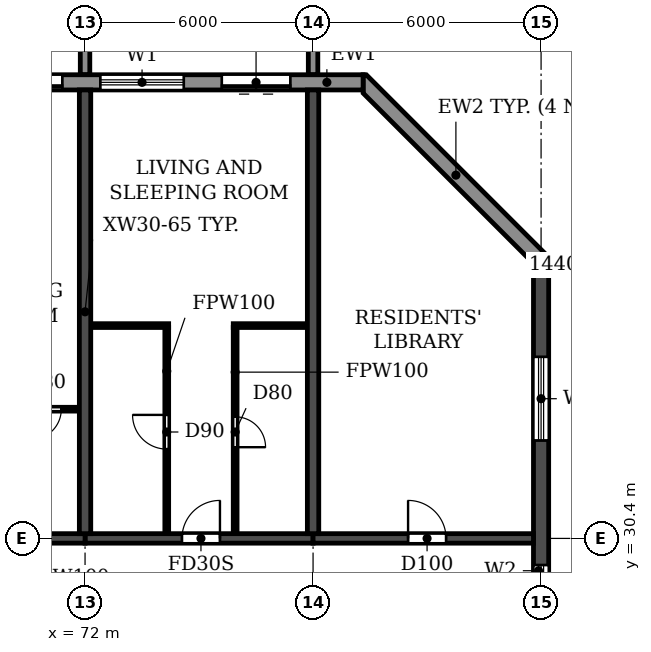
"""IFC4 building model, lengths in metres.
Left out: names, types, materials, properties, quantities, classifications, styles, units other than length and angle.
Written with IfcOpenShell. Run it as: python <this file> out.ifc"""

import sys

from ifc_helpers import new_model, si_unit, direction, frame, frame_2d, origin, place, context, subcontext, project, spatial, polyline, rectangle, outline, extrude, source, transform, mapped, element, fill, save


model = new_model("IFC4")
c1 = context("Model", 3, precision=1e-05, world=origin(), true_north=direction((0.0, 1.0)))
c2 = subcontext(c1, "Body", "Model", "MODEL_VIEW")
j1 = project(units=[si_unit("LENGTHUNIT", "METRE"), si_unit("PLANEANGLEUNIT", "RADIAN")], contexts=[c1])
p1 = place(None, origin())
s1 = spatial("IfcSite", under=j1, at=p1, CompositionType="ELEMENT")
p2 = place(p1, origin())
s2 = spatial("IfcBuilding", under=s1, at=p2, CompositionType="ELEMENT")
p3 = place(p2, frame((0.0, 0.0, 162.0)))
s3 = spatial("IfcBuildingStorey", under=s2, at=p3, CompositionType="ELEMENT", Elevation=162.0)
for number, where, z_axis, x_axis in (
    (1, (72.0, 30.525, 0.0), (0.0, 0.0, 1.0), (0.0, 1.0, 0.0)),
    (2, (78.0, 30.525, 0.0), (0.0, 0.0, 1.0), (0.0, 1.0, 0.0)),
):
    element("IfcWall", number, at=place(p3, frame(where, z_axis=z_axis, x_axis=x_axis)), inside=s3, PredefinedType="SHEAR", context=c2, shape_type="SweptSolid", body=[
        extrude(rectangle(XDim=11.675, YDim=0.3, at=frame_2d((5.837, 0.0))), origin(), (0.0, 0.0, 1.0), 2.95),
    ])
p4 = place(p3, frame((84.0, 4.683, 0.0), z_axis=(0.0, 0.0, 1.0), x_axis=(0.0, 1.0, 0.0)))
e3 = element("IfcWall", 3, at=p4, inside=s3, PredefinedType="SHEAR", context=c2, shape_type="SweptSolid", body=[
    extrude(rectangle(XDim=33.034, YDim=0.4, at=frame_2d((16.517, 0.0))), origin(), (0.0, 0.0, 1.0), 2.95),
])
p5 = place(p4, frame((23.817, 0.0, 0.9)))
e4 = element("IfcOpeningElement", 4, at=p5, cuts=e3, PredefinedType="OPENING", context=c2, shape_type="SweptSolid", body=[
    extrude(rectangle(XDim=1.2, YDim=1.5, at=frame_2d((0.6, 0.75))), frame((0.0, 0.21, 0.0), z_axis=(0.0, -1.0, 0.0), x_axis=(1.0, 0.0, 0.0)), (0.0, 0.0, 1.0), 0.42),
])
p6 = place(p4, frame((8.017, 0.0, 0.9)))
e5 = element("IfcOpeningElement", 5, at=p6, cuts=e3, PredefinedType="OPENING", context=c2, shape_type="SweptSolid", body=[
    extrude(rectangle(XDim=1.2, YDim=1.5, at=frame_2d((0.6, 0.75))), frame((0.0, 0.21, 0.0), z_axis=(0.0, -1.0, 0.0), x_axis=(1.0, 0.0, 0.0)), (0.0, 0.0, 1.0), 0.42),
])
p7 = place(p4, frame((28.293, 0.0, 0.6)))
e6 = element("IfcOpeningElement", 6, at=p7, cuts=e3, PredefinedType="OPENING", context=c2, shape_type="SweptSolid", body=[
    extrude(rectangle(XDim=2.2, YDim=1.8, at=frame_2d((1.1, 0.9))), frame((0.0, 0.21, 0.0), z_axis=(0.0, -1.0, 0.0), x_axis=(1.0, 0.0, 0.0)), (0.0, 0.0, 1.0), 0.42),
])
p8 = place(p4, frame((2.541, 0.0, 0.6)))
e7 = element("IfcOpeningElement", 7, at=p8, cuts=e3, PredefinedType="OPENING", context=c2, shape_type="SweptSolid", body=[
    extrude(rectangle(XDim=2.2, YDim=1.8, at=frame_2d((1.1, 0.9))), frame((0.0, 0.21, 0.0), z_axis=(0.0, -1.0, 0.0), x_axis=(1.0, 0.0, 0.0)), (0.0, 0.0, 1.0), 0.42),
])
p9 = place(p4, frame((15.917, 0.0, 0.9)))
e8 = element("IfcOpeningElement", 8, at=p9, cuts=e3, PredefinedType="OPENING", context=c2, shape_type="SweptSolid", body=[
    extrude(rectangle(XDim=1.2, YDim=1.5, at=frame_2d((0.6, 0.75))), frame((0.0, 0.21, 0.0), z_axis=(0.0, -1.0, 0.0), x_axis=(1.0, 0.0, 0.0)), (0.0, 0.0, 1.0), 0.42),
])
p10 = place(p3, frame((66.0, 30.4, 0.0), z_axis=(0.0, 0.0, 1.0), x_axis=(1.0, 0.0, 0.0)))
e9 = element("IfcWall", 9, at=p10, inside=s3, PredefinedType="SHEAR", context=c2, shape_type="SweptSolid", body=[
    extrude(rectangle(XDim=6.0, YDim=0.25, at=frame_2d((3.0, 0.0))), origin(), (0.0, 0.0, 1.0), 2.35),
])
p11 = place(p10, frame((2.55, 0.0, 0.0)))
e10 = element("IfcOpeningElement", 10, at=p11, cuts=e9, PredefinedType="OPENING", context=c2, shape_type="SweptSolid", body=[
    extrude(rectangle(XDim=1.0, YDim=2.1, at=frame_2d((0.5, 1.05))), frame((0.0, 0.135, 0.0), z_axis=(0.0, -1.0, 0.0), x_axis=(1.0, 0.0, 0.0)), (0.0, 0.0, 1.0), 0.27),
])
p12 = place(p3, frame((72.0, 30.4, 0.0), z_axis=(0.0, 0.0, 1.0), x_axis=(1.0, 0.0, 0.0)))
e11 = element("IfcWall", 11, at=p12, inside=s3, PredefinedType="SHEAR", context=c2, shape_type="SweptSolid", body=[
    extrude(rectangle(XDim=6.0, YDim=0.25, at=frame_2d((3.0, 0.0))), origin(), (0.0, 0.0, 1.0), 2.35),
])
p13 = place(p12, frame((2.55, 0.0, 0.0)))
e12 = element("IfcOpeningElement", 12, at=p13, cuts=e11, PredefinedType="OPENING", context=c2, shape_type="SweptSolid", body=[
    extrude(rectangle(XDim=1.0, YDim=2.1, at=frame_2d((0.5, 1.05))), frame((0.0, 0.135, 0.0), z_axis=(0.0, -1.0, 0.0), x_axis=(1.0, 0.0, 0.0)), (0.0, 0.0, 1.0), 0.27),
])
p14 = place(p3, frame((78.0, 30.4, 0.0), z_axis=(0.0, 0.0, 1.0), x_axis=(1.0, 0.0, 0.0)))
e13 = element("IfcWall", 13, at=p14, inside=s3, PredefinedType="SHEAR", context=c2, shape_type="SweptSolid", body=[
    extrude(rectangle(XDim=5.8, YDim=0.25, at=frame_2d((2.9, 0.0))), origin(), (0.0, 0.0, 1.0), 2.35),
])
p15 = place(p14, frame((2.5, 0.0, 0.0)))
e14 = element("IfcOpeningElement", 14, at=p15, cuts=e13, PredefinedType="OPENING", context=c2, shape_type="SweptSolid", body=[
    extrude(rectangle(XDim=1.0, YDim=2.1, at=frame_2d((0.5, 1.05))), frame((0.0, 0.135, 0.0), z_axis=(0.0, -1.0, 0.0), x_axis=(1.0, 0.0, 0.0)), (0.0, 0.0, 1.0), 0.27),
])
p16 = place(p3, origin())
e15 = element("IfcWall", 15, at=p16, inside=s3, PredefinedType="STANDARD", context=c2, shape_type="SweptSolid", body=[
    extrude(outline(polyline([(84.2, 37.717), (84.2, 37.8), (79.4, 42.6), (79.317, 42.6), (79.317, 42.117), (83.717, 37.717), (84.2, 37.717)])), origin(), (0.0, 0.0, 1.0), 2.95),
])
p17 = place(p3, frame((79.317, 42.4, 0.0), z_axis=(0.0, 0.0, 1.0), x_axis=(-1.0, 0.0, 0.0)))
e16 = element("IfcWall", 16, at=p17, inside=s3, PredefinedType="STANDARD", context=c2, shape_type="SweptSolid", body=[
    extrude(rectangle(XDim=56.634, YDim=0.4, at=frame_2d((28.317, 0.0))), origin(), (0.0, 0.0, 1.0), 2.95),
])
p18 = place(p17, frame((52.717, 0.0, 0.9)))
e17 = element("IfcOpeningElement", 17, at=p18, cuts=e16, PredefinedType="OPENING", context=c2, shape_type="SweptSolid", body=[
    extrude(rectangle(XDim=2.2, YDim=1.5, at=frame_2d((1.1, 0.75))), frame((0.0, 0.21, 0.0), z_axis=(0.0, -1.0, 0.0), x_axis=(1.0, 0.0, 0.0)), (0.0, 0.0, 1.0), 0.42),
])
p19 = place(p17, frame((49.917, 0.0, 0.0)))
e18 = element("IfcOpeningElement", 18, at=p19, cuts=e16, PredefinedType="OPENING", context=c2, shape_type="SweptSolid", body=[
    extrude(rectangle(XDim=1.8, YDim=2.4, at=frame_2d((0.9, 1.2))), frame((0.0, 0.21, 0.0), z_axis=(0.0, -1.0, 0.0), x_axis=(1.0, 0.0, 0.0)), (0.0, 0.0, 1.0), 0.42),
])
p20 = place(p17, frame((46.717, 0.0, 0.9)))
e19 = element("IfcOpeningElement", 19, at=p20, cuts=e16, PredefinedType="OPENING", context=c2, shape_type="SweptSolid", body=[
    extrude(rectangle(XDim=2.2, YDim=1.5, at=frame_2d((1.1, 0.75))), frame((0.0, 0.21, 0.0), z_axis=(0.0, -1.0, 0.0), x_axis=(1.0, 0.0, 0.0)), (0.0, 0.0, 1.0), 0.42),
])
p21 = place(p17, frame((43.917, 0.0, 0.0)))
e20 = element("IfcOpeningElement", 20, at=p21, cuts=e16, PredefinedType="OPENING", context=c2, shape_type="SweptSolid", body=[
    extrude(rectangle(XDim=1.8, YDim=2.4, at=frame_2d((0.9, 1.2))), frame((0.0, 0.21, 0.0), z_axis=(0.0, -1.0, 0.0), x_axis=(1.0, 0.0, 0.0)), (0.0, 0.0, 1.0), 0.42),
])
p22 = place(p17, frame((40.717, 0.0, 0.9)))
e21 = element("IfcOpeningElement", 21, at=p22, cuts=e16, PredefinedType="OPENING", context=c2, shape_type="SweptSolid", body=[
    extrude(rectangle(XDim=2.2, YDim=1.5, at=frame_2d((1.1, 0.75))), frame((0.0, 0.21, 0.0), z_axis=(0.0, -1.0, 0.0), x_axis=(1.0, 0.0, 0.0)), (0.0, 0.0, 1.0), 0.42),
])
p23 = place(p17, frame((37.917, 0.0, 0.0)))
e22 = element("IfcOpeningElement", 22, at=p23, cuts=e16, PredefinedType="OPENING", context=c2, shape_type="SweptSolid", body=[
    extrude(rectangle(XDim=1.8, YDim=2.4, at=frame_2d((0.9, 1.2))), frame((0.0, 0.21, 0.0), z_axis=(0.0, -1.0, 0.0), x_axis=(1.0, 0.0, 0.0)), (0.0, 0.0, 1.0), 0.42),
])
p24 = place(p17, frame((34.717, 0.0, 0.9)))
e23 = element("IfcOpeningElement", 23, at=p24, cuts=e16, PredefinedType="OPENING", context=c2, shape_type="SweptSolid", body=[
    extrude(rectangle(XDim=2.2, YDim=1.5, at=frame_2d((1.1, 0.75))), frame((0.0, 0.21, 0.0), z_axis=(0.0, -1.0, 0.0), x_axis=(1.0, 0.0, 0.0)), (0.0, 0.0, 1.0), 0.42),
])
p25 = place(p17, frame((31.717, 0.0, 0.9)))
e24 = element("IfcOpeningElement", 24, at=p25, cuts=e16, PredefinedType="OPENING", context=c2, shape_type="SweptSolid", body=[
    extrude(rectangle(XDim=2.2, YDim=1.5, at=frame_2d((1.1, 0.75))), frame((0.0, 0.21, 0.0), z_axis=(0.0, -1.0, 0.0), x_axis=(1.0, 0.0, 0.0)), (0.0, 0.0, 1.0), 0.42),
])
p26 = place(p17, frame((28.717, 0.0, 0.9)))
e25 = element("IfcOpeningElement", 25, at=p26, cuts=e16, PredefinedType="OPENING", context=c2, shape_type="SweptSolid", body=[
    extrude(rectangle(XDim=2.2, YDim=1.5, at=frame_2d((1.1, 0.75))), frame((0.0, 0.21, 0.0), z_axis=(0.0, -1.0, 0.0), x_axis=(1.0, 0.0, 0.0)), (0.0, 0.0, 1.0), 0.42),
])
p27 = place(p17, frame((25.717, 0.0, 0.9)))
e26 = element("IfcOpeningElement", 26, at=p27, cuts=e16, PredefinedType="OPENING", context=c2, shape_type="SweptSolid", body=[
    extrude(rectangle(XDim=2.2, YDim=1.5, at=frame_2d((1.1, 0.75))), frame((0.0, 0.21, 0.0), z_axis=(0.0, -1.0, 0.0), x_axis=(1.0, 0.0, 0.0)), (0.0, 0.0, 1.0), 0.42),
])
p28 = place(p17, frame((22.717, 0.0, 0.9)))
e27 = element("IfcOpeningElement", 27, at=p28, cuts=e16, PredefinedType="OPENING", context=c2, shape_type="SweptSolid", body=[
    extrude(rectangle(XDim=2.2, YDim=1.5, at=frame_2d((1.1, 0.75))), frame((0.0, 0.21, 0.0), z_axis=(0.0, -1.0, 0.0), x_axis=(1.0, 0.0, 0.0)), (0.0, 0.0, 1.0), 0.42),
])
p29 = place(p17, frame((19.917, 0.0, 0.0)))
e28 = element("IfcOpeningElement", 28, at=p29, cuts=e16, PredefinedType="OPENING", context=c2, shape_type="SweptSolid", body=[
    extrude(rectangle(XDim=1.8, YDim=2.4, at=frame_2d((0.9, 1.2))), frame((0.0, 0.21, 0.0), z_axis=(0.0, -1.0, 0.0), x_axis=(1.0, 0.0, 0.0)), (0.0, 0.0, 1.0), 0.42),
])
p30 = place(p17, frame((16.717, 0.0, 0.9)))
e29 = element("IfcOpeningElement", 29, at=p30, cuts=e16, PredefinedType="OPENING", context=c2, shape_type="SweptSolid", body=[
    extrude(rectangle(XDim=2.2, YDim=1.5, at=frame_2d((1.1, 0.75))), frame((0.0, 0.21, 0.0), z_axis=(0.0, -1.0, 0.0), x_axis=(1.0, 0.0, 0.0)), (0.0, 0.0, 1.0), 0.42),
])
p31 = place(p17, frame((13.717, 0.0, 0.9)))
e30 = element("IfcOpeningElement", 30, at=p31, cuts=e16, PredefinedType="OPENING", context=c2, shape_type="SweptSolid", body=[
    extrude(rectangle(XDim=2.2, YDim=1.5, at=frame_2d((1.1, 0.75))), frame((0.0, 0.21, 0.0), z_axis=(0.0, -1.0, 0.0), x_axis=(1.0, 0.0, 0.0)), (0.0, 0.0, 1.0), 0.42),
])
p32 = place(p17, frame((10.717, 0.0, 0.9)))
e31 = element("IfcOpeningElement", 31, at=p32, cuts=e16, PredefinedType="OPENING", context=c2, shape_type="SweptSolid", body=[
    extrude(rectangle(XDim=2.2, YDim=1.5, at=frame_2d((1.1, 0.75))), frame((0.0, 0.21, 0.0), z_axis=(0.0, -1.0, 0.0), x_axis=(1.0, 0.0, 0.0)), (0.0, 0.0, 1.0), 0.42),
])
p33 = place(p17, frame((7.917, 0.0, 0.0)))
e32 = element("IfcOpeningElement", 32, at=p33, cuts=e16, PredefinedType="OPENING", context=c2, shape_type="SweptSolid", body=[
    extrude(rectangle(XDim=1.8, YDim=2.4, at=frame_2d((0.9, 1.2))), frame((0.0, 0.21, 0.0), z_axis=(0.0, -1.0, 0.0), x_axis=(1.0, 0.0, 0.0)), (0.0, 0.0, 1.0), 0.42),
])
p34 = place(p17, frame((4.717, 0.0, 0.9)))
e33 = element("IfcOpeningElement", 33, at=p34, cuts=e16, PredefinedType="OPENING", context=c2, shape_type="SweptSolid", body=[
    extrude(rectangle(XDim=2.2, YDim=1.5, at=frame_2d((1.1, 0.75))), frame((0.0, 0.21, 0.0), z_axis=(0.0, -1.0, 0.0), x_axis=(1.0, 0.0, 0.0)), (0.0, 0.0, 1.0), 0.42),
])
p35 = place(p17, frame((1.917, 0.0, 0.0)))
e34 = element("IfcOpeningElement", 34, at=p35, cuts=e16, PredefinedType="OPENING", context=c2, shape_type="SweptSolid", body=[
    extrude(rectangle(XDim=1.8, YDim=2.4, at=frame_2d((0.9, 1.2))), frame((0.0, 0.21, 0.0), z_axis=(0.0, -1.0, 0.0), x_axis=(1.0, 0.0, 0.0)), (0.0, 0.0, 1.0), 0.42),
])
m1 = source(origin(), c2, "Body", "SweptSolid", [
    extrude(outline(polyline([(0.0, 0.0), (0.25, 0.0), (0.25, 3.1), (0.0, 3.1), (0.0, 0.0)])), origin(), (0.0, 0.0, 1.0), 3.1),
])
for number, where in (
    (35, (71.875, 42.6, 0.0)),
    (36, (77.875, 42.6, 0.0)),
):
    element("IfcWall", number, at=place(p3, frame(where)), inside=s3, PredefinedType="STANDARD", context=c2, shape_type="MappedRepresentation", body=[
        mapped(m1, transform((0.0, 0.0, 0.0))),
    ])
p36 = place(p3, frame((69.9, 33.8, 0.0), z_axis=(0.0, 0.0, 1.0), x_axis=(1.0, 0.0, 0.0)))
e37 = element("IfcWall", 37, at=p36, inside=s3, PredefinedType="PARTITIONING", context=c2, shape_type="SweptSolid", body=[
    extrude(rectangle(XDim=1.94, YDim=0.1, at=frame_2d((0.97, 0.0))), origin(), (0.0, 0.0, 1.0), 2.95),
])
p37 = place(p36, frame((0.675, 0.0, 0.0)))
e38 = element("IfcOpeningElement", 38, at=p37, cuts=e37, PredefinedType="OPENING", context=c2, shape_type="SweptSolid", body=[
    extrude(rectangle(XDim=0.8, YDim=2.1, at=frame_2d((0.4, 1.05))), frame((0.0, 0.06, 0.0), z_axis=(0.0, -1.0, 0.0), x_axis=(1.0, 0.0, 0.0)), (0.0, 0.0, 1.0), 0.12),
])
p38 = place(p3, frame((72.16, 36.0, 0.0), z_axis=(0.0, 0.0, 1.0), x_axis=(1.0, 0.0, 0.0)))
e39 = element("IfcWall", 39, at=p38, inside=s3, PredefinedType="PARTITIONING", context=c2, shape_type="SweptSolid", body=[
    extrude(rectangle(XDim=2.04, YDim=0.1, at=frame_2d((1.02, 0.0))), origin(), (0.0, 0.0, 1.0), 2.95),
])
p39 = place(p3, frame((75.9, 36.0, 0.0), z_axis=(0.0, 0.0, 1.0), x_axis=(1.0, 0.0, 0.0)))
e40 = element("IfcWall", 40, at=p39, inside=s3, PredefinedType="PARTITIONING", context=c2, shape_type="SweptSolid", body=[
    extrude(rectangle(XDim=1.94, YDim=0.1, at=frame_2d((0.97, 0.0))), origin(), (0.0, 0.0, 1.0), 2.95),
])
p40 = place(p3, frame((74.15, 30.535, 0.0), z_axis=(0.0, 0.0, 1.0), x_axis=(0.0, 1.0, 0.0)))
e41 = element("IfcWall", 41, at=p40, inside=s3, PredefinedType="PARTITIONING", context=c2, shape_type="SweptSolid", body=[
    extrude(rectangle(XDim=5.415, YDim=0.1, at=frame_2d((2.708, 0.0))), origin(), (0.0, 0.0, 1.0), 2.95),
])
p41 = place(p40, frame((2.215, 0.0, 0.0)))
e42 = element("IfcOpeningElement", 42, at=p41, cuts=e41, PredefinedType="OPENING", context=c2, shape_type="SweptSolid", body=[
    extrude(rectangle(XDim=0.9, YDim=2.1, at=frame_2d((0.45, 1.05))), frame((0.0, 0.06, 0.0), z_axis=(0.0, -1.0, 0.0), x_axis=(1.0, 0.0, 0.0)), (0.0, 0.0, 1.0), 0.12),
])
p42 = place(p3, frame((75.95, 30.535, 0.0), z_axis=(0.0, 0.0, 1.0), x_axis=(0.0, 1.0, 0.0)))
e43 = element("IfcWall", 43, at=p42, inside=s3, PredefinedType="PARTITIONING", context=c2, shape_type="SweptSolid", body=[
    extrude(rectangle(XDim=5.415, YDim=0.1, at=frame_2d((2.708, 0.0))), origin(), (0.0, 0.0, 1.0), 2.95),
])
p43 = place(p42, frame((2.265, 0.0, 0.0)))
e44 = element("IfcOpeningElement", 44, at=p43, cuts=e43, PredefinedType="OPENING", context=c2, shape_type="SweptSolid", body=[
    extrude(rectangle(XDim=0.8, YDim=2.1, at=frame_2d((0.4, 1.05))), frame((0.0, 0.06, 0.0), z_axis=(0.0, -1.0, 0.0), x_axis=(1.0, 0.0, 0.0)), (0.0, 0.0, 1.0), 0.12),
])
p44 = place(p5, origin())
e45 = element("IfcWindow", 45, at=p44, inside=s3, PartitioningType="SINGLE_PANEL", PredefinedType="WINDOW", context=c2, shape_type="SweptSolid", body=[
    extrude(rectangle(XDim=1.2, YDim=1.5, at=frame_2d((0.6, 0.75))), frame((0.0, 0.03, 0.0), z_axis=(0.0, -1.0, 0.0), x_axis=(1.0, 0.0, 0.0)), (0.0, 0.0, 1.0), 0.06),
])
fill(e4, e45)
p45 = place(p7, origin())
e46 = element("IfcWindow", 46, at=p45, inside=s3, PartitioningType="DOUBLE_PANEL_HORIZONTAL", PredefinedType="WINDOW", context=c2, shape_type="SweptSolid", body=[
    extrude(rectangle(XDim=2.2, YDim=1.8, at=frame_2d((1.1, 0.9))), frame((0.0, 0.03, 0.0), z_axis=(0.0, -1.0, 0.0), x_axis=(1.0, 0.0, 0.0)), (0.0, 0.0, 1.0), 0.06),
])
fill(e6, e46)
p46 = place(p33, origin())
e47 = element("IfcDoor", 47, at=p46, inside=s3, OperationType="DOUBLE_DOOR_SLIDING", PredefinedType="DOOR", context=c2, shape_type="SweptSolid", body=[
    extrude(rectangle(XDim=1.8, YDim=2.4, at=frame_2d((0.9, 1.2))), frame((0.0, 0.025, 0.0), z_axis=(0.0, -1.0, 0.0), x_axis=(1.0, 0.0, 0.0)), (0.0, 0.0, 1.0), 0.05),
])
fill(e32, e47)
p47 = place(p34, origin())
e48 = element("IfcWindow", 48, at=p47, inside=s3, PartitioningType="DOUBLE_PANEL_HORIZONTAL", PredefinedType="WINDOW", context=c2, shape_type="SweptSolid", body=[
    extrude(rectangle(XDim=2.2, YDim=1.5, at=frame_2d((1.1, 0.75))), frame((0.0, 0.03, 0.0), z_axis=(0.0, -1.0, 0.0), x_axis=(1.0, 0.0, 0.0)), (0.0, 0.0, 1.0), 0.06),
])
fill(e33, e48)
p48 = place(p35, origin())
e49 = element("IfcDoor", 49, at=p48, inside=s3, OperationType="DOUBLE_DOOR_SLIDING", PredefinedType="DOOR", context=c2, shape_type="SweptSolid", body=[
    extrude(rectangle(XDim=1.8, YDim=2.4, at=frame_2d((0.9, 1.2))), frame((0.0, 0.025, 0.0), z_axis=(0.0, -1.0, 0.0), x_axis=(1.0, 0.0, 0.0)), (0.0, 0.0, 1.0), 0.05),
])
fill(e34, e49)
p49 = place(p37, frame((0.8, 0.0, 0.0), z_axis=(0.0, 0.0, 1.0), x_axis=(-1.0, 0.0, 0.0)))
e50 = element("IfcDoor", 50, at=p49, inside=s3, OperationType="SINGLE_SWING_RIGHT", PredefinedType="DOOR", context=c2, shape_type="SweptSolid", body=[
    extrude(rectangle(XDim=0.8, YDim=2.1, at=frame_2d((0.4, 1.05))), frame((0.0, 0.025, 0.0), z_axis=(0.0, -1.0, 0.0), x_axis=(1.0, 0.0, 0.0)), (0.0, 0.0, 1.0), 0.05),
])
fill(e38, e50)
p50 = place(p41, origin())
e51 = element("IfcDoor", 51, at=p50, inside=s3, OperationType="SINGLE_SWING_RIGHT", PredefinedType="DOOR", context=c2, shape_type="SweptSolid", body=[
    extrude(rectangle(XDim=0.9, YDim=2.1, at=frame_2d((0.45, 1.05))), frame((0.0, 0.025, 0.0), z_axis=(0.0, -1.0, 0.0), x_axis=(1.0, 0.0, 0.0)), (0.0, 0.0, 1.0), 0.05),
])
fill(e42, e51)
p51 = place(p13, origin())
e52 = element("IfcDoor", 52, at=p51, inside=s3, OperationType="SINGLE_SWING_RIGHT", PredefinedType="DOOR", context=c2, shape_type="SweptSolid", body=[
    extrude(rectangle(XDim=1.0, YDim=2.1, at=frame_2d((0.5, 1.05))), frame((0.0, 0.025, 0.0), z_axis=(0.0, -1.0, 0.0), x_axis=(1.0, 0.0, 0.0)), (0.0, 0.0, 1.0), 0.05),
])
fill(e12, e52)
p52 = place(p43, frame((0.8, 0.0, 0.0), z_axis=(0.0, 0.0, 1.0), x_axis=(-1.0, 0.0, 0.0)))
e53 = element("IfcDoor", 53, at=p52, inside=s3, OperationType="SINGLE_SWING_RIGHT", PredefinedType="DOOR", context=c2, shape_type="SweptSolid", body=[
    extrude(rectangle(XDim=0.8, YDim=2.1, at=frame_2d((0.4, 1.05))), frame((0.0, 0.025, 0.0), z_axis=(0.0, -1.0, 0.0), x_axis=(1.0, 0.0, 0.0)), (0.0, 0.0, 1.0), 0.05),
])
fill(e44, e53)
p53 = place(p15, origin())
e54 = element("IfcDoor", 54, at=p53, inside=s3, OperationType="SINGLE_SWING_LEFT", PredefinedType="DOOR", context=c2, shape_type="SweptSolid", body=[
    extrude(rectangle(XDim=1.0, YDim=2.1, at=frame_2d((0.5, 1.05))), frame((0.0, 0.025, 0.0), z_axis=(0.0, -1.0, 0.0), x_axis=(1.0, 0.0, 0.0)), (0.0, 0.0, 1.0), 0.05),
])
fill(e14, e54)
save(model, sys.argv[1])
